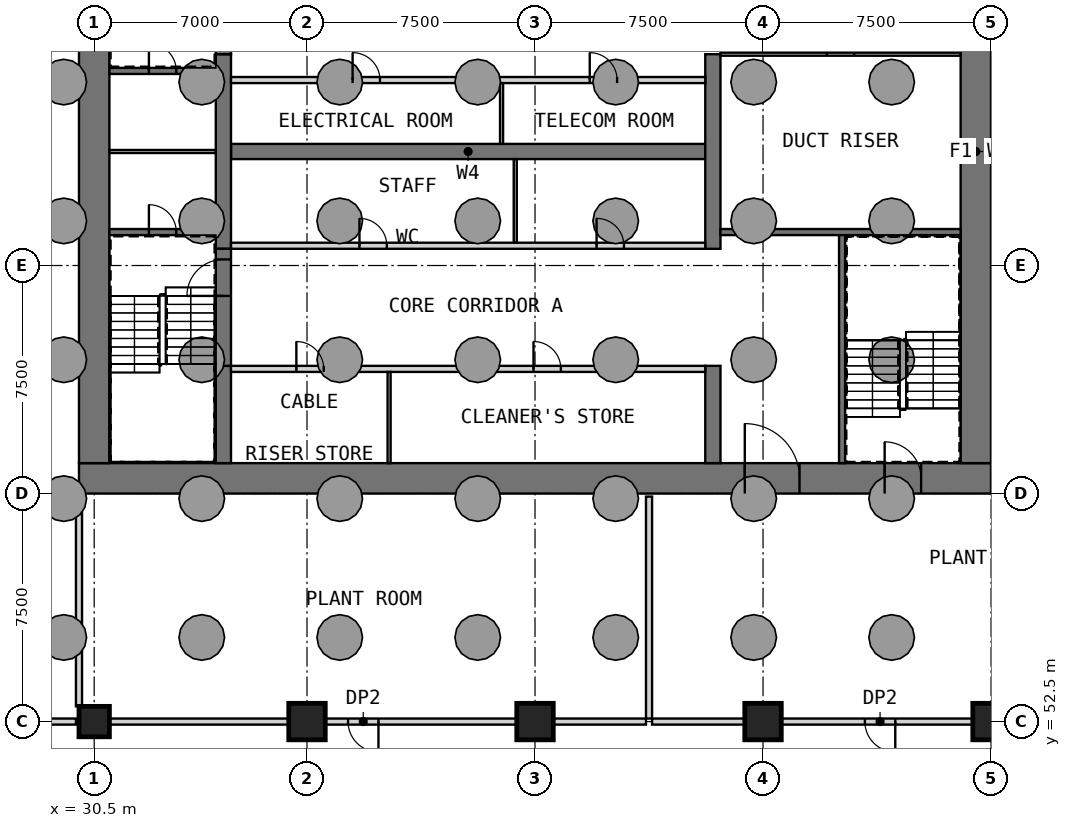
"""IFC4 building model, lengths in metres.
Left out: names, types, materials, properties, quantities, classifications, styles, units other than length and angle.
Written with IfcOpenShell. Run it as: python <this file> out.ifc"""

import sys

from ifc_helpers import new_model, si_unit, direction, frame, frame_2d, origin, origin_2d, place, context, subcontext, project, spatial, rectangle, extrude, element, fill, save


model = new_model("IFC4")
c1 = context("Model", 3, precision=1e-05, world=origin(), true_north=direction((0.0, 1.0)))
c2 = subcontext(c1, "Body", "Model", "MODEL_VIEW")
j1 = project(units=[si_unit("LENGTHUNIT", "METRE"), si_unit("PLANEANGLEUNIT", "RADIAN")], contexts=[c1])
p1 = place(None, origin())
s1 = spatial("IfcSite", under=j1, at=p1, CompositionType="ELEMENT")
p2 = place(p1, origin())
s2 = spatial("IfcBuilding", under=s1, at=p2, CompositionType="ELEMENT")
p3 = place(p2, frame((0.0, 0.0, -12.0)))
s3 = spatial("IfcBuildingStorey", under=s2, at=p3, CompositionType="ELEMENT", Elevation=-12.0)
p4 = place(p3, frame((30.5, 52.5, 0.0), z_axis=(0.0, 0.0, 1.0), x_axis=(1.0, 0.0, 0.0)))
e1 = element("IfcColumn", 1, at=p4, inside=s3, PredefinedType="COLUMN", context=c2, shape_type="SweptSolid", body=[
    extrude(rectangle(XDim=1.0, YDim=1.0, at=origin_2d()), origin(), (0.0, 0.0, 1.0), 6.0),
])
for number, where, z_axis, x_axis in (
    (2, (37.5, 52.5, 0.0), (0.0, 0.0, 1.0), (1.0, 0.0, 0.0)),
    (3, (45.0, 52.5, 0.0), (0.0, 0.0, 1.0), (1.0, 0.0, 0.0)),
    (4, (52.5, 52.5, 0.0), (0.0, 0.0, 1.0), (1.0, 0.0, 0.0)),
    (5, (60.0, 52.5, 0.0), (0.0, 0.0, 1.0), (1.0, 0.0, 0.0)),
):
    element("IfcColumn", number, at=place(p3, frame(where, z_axis=z_axis, x_axis=x_axis)), inside=s3, PredefinedType="COLUMN", context=c2, shape_type="SweptSolid", body=[
        extrude(rectangle(XDim=1.2, YDim=1.2, at=origin_2d()), origin(), (0.0, 0.0, 1.0), 6.0),
    ])
p5 = place(p3, frame((30.0, 60.5, 0.0), z_axis=(0.0, 0.0, 1.0), x_axis=(1.0, 0.0, 0.0)))
e6 = element("IfcWall", 6, at=p5, inside=s3, PredefinedType="SHEAR", context=c2, shape_type="SweptSolid", body=[
    extrude(rectangle(XDim=30.0, YDim=1.0, at=frame_2d((15.0, 0.0))), origin(), (0.0, 0.0, 1.0), 6.0),
])
p6 = place(p5, frame((21.9, 0.0, 0.0)))
e7 = element("IfcOpeningElement", 7, at=p6, cuts=e6, PredefinedType="OPENING", context=c2, shape_type="SweptSolid", body=[
    extrude(rectangle(XDim=1.8, YDim=2.1, at=frame_2d((0.9, 1.05))), frame((0.0, 0.51, 0.0), z_axis=(0.0, -1.0, 0.0), x_axis=(1.0, 0.0, 0.0)), (0.0, 0.0, 1.0), 1.02),
])
p7 = place(p5, frame((26.5, 0.0, 0.0)))
e8 = element("IfcOpeningElement", 8, at=p7, cuts=e6, PredefinedType="OPENING", context=c2, shape_type="SweptSolid", body=[
    extrude(rectangle(XDim=1.2, YDim=2.1, at=frame_2d((0.6, 1.05))), frame((0.0, 0.51, 0.0), z_axis=(0.0, -1.0, 0.0), x_axis=(1.0, 0.0, 0.0)), (0.0, 0.0, 1.0), 1.02),
])
p8 = place(p3, frame((30.5, 61.0, 0.0), z_axis=(0.0, 0.0, 1.0), x_axis=(0.0, 1.0, 0.0)))
e9 = element("IfcWall", 9, at=p8, inside=s3, PredefinedType="SHEAR", context=c2, shape_type="SweptSolid", body=[
    extrude(rectangle(XDim=20.5, YDim=1.0, at=frame_2d((10.25, 0.0))), origin(), (0.0, 0.0, 1.0), 6.0),
])
p9 = place(p3, frame((59.5, 61.0, 0.0), z_axis=(0.0, 0.0, 1.0), x_axis=(0.0, 1.0, 0.0)))
e10 = element("IfcWall", 10, at=p9, inside=s3, PredefinedType="SHEAR", context=c2, shape_type="SweptSolid", body=[
    extrude(rectangle(XDim=20.5, YDim=1.0, at=frame_2d((10.25, 0.0))), origin(), (0.0, 0.0, 1.0), 6.0),
])
p10 = place(p9, frame((14.5, 0.0, 0.0)))
e11 = element("IfcOpeningElement", 11, at=p10, cuts=e10, PredefinedType="OPENING", context=c2, shape_type="SweptSolid", body=[
    extrude(rectangle(XDim=1.8, YDim=2.1, at=frame_2d((0.9, 1.05))), frame((0.0, 0.51, 0.0), z_axis=(0.0, -1.0, 0.0), x_axis=(1.0, 0.0, 0.0)), (0.0, 0.0, 1.0), 1.02),
])
p11 = place(p3, frame((35.0, 71.25, 0.0), z_axis=(0.0, 0.0, 1.0), x_axis=(1.0, 0.0, 0.0)))
e12 = element("IfcWall", 12, at=p11, inside=s3, PredefinedType="SHEAR", context=c2, shape_type="SweptSolid", body=[
    extrude(rectangle(XDim=15.6, YDim=0.5, at=frame_2d((7.8, 0.0))), origin(), (0.0, 0.0, 1.0), 6.0),
])
p12 = place(p3, frame((34.75, 61.0, 0.0), z_axis=(0.0, 0.0, 1.0), x_axis=(0.0, 1.0, 0.0)))
e13 = element("IfcWall", 13, at=p12, inside=s3, PredefinedType="SHEAR", context=c2, shape_type="SweptSolid", body=[
    extrude(rectangle(XDim=3.2, YDim=0.5, at=frame_2d((1.6, 0.0))), origin(), (0.0, 0.0, 1.0), 6.0),
])
p13 = place(p3, frame((34.75, 68.05, 0.0), z_axis=(0.0, 0.0, 1.0), x_axis=(0.0, 1.0, 0.0)))
e14 = element("IfcWall", 14, at=p13, inside=s3, PredefinedType="SHEAR", context=c2, shape_type="SweptSolid", body=[
    extrude(rectangle(XDim=6.4, YDim=0.5, at=frame_2d((3.2, 0.0))), origin(), (0.0, 0.0, 1.0), 6.0),
])
p14 = place(p3, frame((50.85, 61.0, 0.0), z_axis=(0.0, 0.0, 1.0), x_axis=(0.0, 1.0, 0.0)))
e15 = element("IfcWall", 15, at=p14, inside=s3, PredefinedType="SHEAR", context=c2, shape_type="SweptSolid", body=[
    extrude(rectangle(XDim=3.2, YDim=0.5, at=frame_2d((1.6, 0.0))), origin(), (0.0, 0.0, 1.0), 6.0),
])
p15 = place(p3, frame((50.85, 68.05, 0.0), z_axis=(0.0, 0.0, 1.0), x_axis=(0.0, 1.0, 0.0)))
e16 = element("IfcWall", 16, at=p15, inside=s3, PredefinedType="SHEAR", context=c2, shape_type="SweptSolid", body=[
    extrude(rectangle(XDim=6.4, YDim=0.5, at=frame_2d((3.2, 0.0))), origin(), (0.0, 0.0, 1.0), 6.0),
])
p16 = place(p3, frame((35.0, 64.1, 0.0), z_axis=(0.0, 0.0, 1.0), x_axis=(1.0, 0.0, 0.0)))
e17 = element("IfcWall", 17, at=p16, inside=s3, PredefinedType="PARTITIONING", context=c2, shape_type="SweptSolid", body=[
    extrude(rectangle(XDim=15.6, YDim=0.2, at=frame_2d((7.8, 0.0))), origin(), (0.0, 0.0, 1.0), 5.4),
])
p17 = place(p16, frame((2.15, 0.0, 0.0)))
e18 = element("IfcOpeningElement", 18, at=p17, cuts=e17, PredefinedType="OPENING", context=c2, shape_type="SweptSolid", body=[
    extrude(rectangle(XDim=0.9, YDim=2.1, at=frame_2d((0.45, 1.05))), frame((0.0, 0.11, 0.0), z_axis=(0.0, -1.0, 0.0), x_axis=(1.0, 0.0, 0.0)), (0.0, 0.0, 1.0), 0.22),
])
p18 = place(p16, frame((9.95, 0.0, 0.0)))
e19 = element("IfcOpeningElement", 19, at=p18, cuts=e17, PredefinedType="OPENING", context=c2, shape_type="SweptSolid", body=[
    extrude(rectangle(XDim=0.9, YDim=2.1, at=frame_2d((0.45, 1.05))), frame((0.0, 0.11, 0.0), z_axis=(0.0, -1.0, 0.0), x_axis=(1.0, 0.0, 0.0)), (0.0, 0.0, 1.0), 0.22),
])
p19 = place(p3, frame((40.2, 61.0, 0.0), z_axis=(0.0, 0.0, 1.0), x_axis=(0.0, 1.0, 0.0)))
e20 = element("IfcWall", 20, at=p19, inside=s3, PredefinedType="PARTITIONING", context=c2, shape_type="SweptSolid", body=[
    extrude(rectangle(XDim=3.0, YDim=0.1, at=frame_2d((1.5, 0.0))), origin(), (0.0, 0.0, 1.0), 5.4),
])
p20 = place(p3, frame((35.0, 68.15, 0.0), z_axis=(0.0, 0.0, 1.0), x_axis=(1.0, 0.0, 0.0)))
e21 = element("IfcWall", 21, at=p20, inside=s3, PredefinedType="PARTITIONING", context=c2, shape_type="SweptSolid", body=[
    extrude(rectangle(XDim=15.6, YDim=0.2, at=frame_2d((7.8, 0.0))), origin(), (0.0, 0.0, 1.0), 5.4),
])
p21 = place(p20, frame((4.225, 0.0, 0.0)))
e22 = element("IfcOpeningElement", 22, at=p21, cuts=e21, PredefinedType="OPENING", context=c2, shape_type="SweptSolid", body=[
    extrude(rectangle(XDim=0.9, YDim=2.1, at=frame_2d((0.45, 1.05))), frame((0.0, 0.11, 0.0), z_axis=(0.0, -1.0, 0.0), x_axis=(1.0, 0.0, 0.0)), (0.0, 0.0, 1.0), 0.22),
])
p22 = place(p20, frame((12.025, 0.0, 0.0)))
e23 = element("IfcOpeningElement", 23, at=p22, cuts=e21, PredefinedType="OPENING", context=c2, shape_type="SweptSolid", body=[
    extrude(rectangle(XDim=0.9, YDim=2.1, at=frame_2d((0.45, 1.05))), frame((0.0, 0.11, 0.0), z_axis=(0.0, -1.0, 0.0), x_axis=(1.0, 0.0, 0.0)), (0.0, 0.0, 1.0), 0.22),
])
p23 = place(p3, frame((44.35, 68.25, 0.0), z_axis=(0.0, 0.0, 1.0), x_axis=(0.0, 1.0, 0.0)))
e24 = element("IfcWall", 24, at=p23, inside=s3, PredefinedType="PARTITIONING", context=c2, shape_type="SweptSolid", body=[
    extrude(rectangle(XDim=2.75, YDim=0.1, at=frame_2d((1.375, 0.0))), origin(), (0.0, 0.0, 1.0), 5.4),
])
p24 = place(p3, frame((35.0, 73.6, 0.0), z_axis=(0.0, 0.0, 1.0), x_axis=(1.0, 0.0, 0.0)))
e25 = element("IfcWall", 25, at=p24, inside=s3, PredefinedType="PARTITIONING", context=c2, shape_type="SweptSolid", body=[
    extrude(rectangle(XDim=15.6, YDim=0.2, at=frame_2d((7.8, 0.0))), origin(), (0.0, 0.0, 1.0), 5.4),
])
p25 = place(p24, frame((4.0, 0.0, 0.0)))
e26 = element("IfcOpeningElement", 26, at=p25, cuts=e25, PredefinedType="OPENING", context=c2, shape_type="SweptSolid", body=[
    extrude(rectangle(XDim=0.9, YDim=2.1, at=frame_2d((0.45, 1.05))), frame((0.0, 0.11, 0.0), z_axis=(0.0, -1.0, 0.0), x_axis=(1.0, 0.0, 0.0)), (0.0, 0.0, 1.0), 0.22),
])
p26 = place(p24, frame((11.8, 0.0, 0.0)))
e27 = element("IfcOpeningElement", 27, at=p26, cuts=e25, PredefinedType="OPENING", context=c2, shape_type="SweptSolid", body=[
    extrude(rectangle(XDim=0.9, YDim=2.1, at=frame_2d((0.45, 1.05))), frame((0.0, 0.11, 0.0), z_axis=(0.0, -1.0, 0.0), x_axis=(1.0, 0.0, 0.0)), (0.0, 0.0, 1.0), 0.22),
])
p27 = place(p3, frame((43.9, 71.5, 0.0), z_axis=(0.0, 0.0, 1.0), x_axis=(0.0, 1.0, 0.0)))
e28 = element("IfcWall", 28, at=p27, inside=s3, PredefinedType="PARTITIONING", context=c2, shape_type="SweptSolid", body=[
    extrude(rectangle(XDim=2.0, YDim=0.1, at=frame_2d((1.0, 0.0))), origin(), (0.0, 0.0, 1.0), 5.4),
])
p28 = place(p3, frame((34.75, 64.2, 0.0), z_axis=(0.0, 0.0, 1.0), x_axis=(0.0, 1.0, 0.0)))
e29 = element("IfcWall", 29, at=p28, inside=s3, PredefinedType="SOLIDWALL", context=c2, shape_type="SweptSolid", body=[
    extrude(rectangle(XDim=3.85, YDim=0.5, at=frame_2d((1.925, 0.0))), origin(), (0.0, 0.0, 1.0), 4.8),
])
p29 = place(p28, frame((2.3, 0.0, 0.0)))
e30 = element("IfcOpeningElement", 30, at=p29, cuts=e29, PredefinedType="OPENING", context=c2, shape_type="SweptSolid", body=[
    extrude(rectangle(XDim=1.2, YDim=2.1, at=frame_2d((0.6, 1.05))), frame((0.0, 0.26, 0.0), z_axis=(0.0, -1.0, 0.0), x_axis=(1.0, 0.0, 0.0)), (0.0, 0.0, 1.0), 0.52),
])
p30 = place(p3, frame((34.75, 74.45, 0.0), z_axis=(0.0, 0.0, 1.0), x_axis=(0.0, 1.0, 0.0)))
e31 = element("IfcWall", 31, at=p30, inside=s3, PredefinedType="SOLIDWALL", context=c2, shape_type="SweptSolid", body=[
    extrude(rectangle(XDim=3.85, YDim=0.5, at=frame_2d((1.925, 0.0))), origin(), (0.0, 0.0, 1.0), 4.8),
])
p31 = place(p30, frame((1.0, 0.0, 0.0)))
e32 = element("IfcOpeningElement", 32, at=p31, cuts=e31, PredefinedType="OPENING", context=c2, shape_type="SweptSolid", body=[
    extrude(rectangle(XDim=1.2, YDim=2.1, at=frame_2d((0.6, 1.05))), frame((0.0, 0.26, 0.0), z_axis=(0.0, -1.0, 0.0), x_axis=(1.0, 0.0, 0.0)), (0.0, 0.0, 1.0), 0.52),
])
p32 = place(p3, frame((31.0, 68.6, 0.0), z_axis=(0.0, 0.0, 1.0), x_axis=(1.0, 0.0, 0.0)))
e33 = element("IfcWall", 33, at=p32, inside=s3, PredefinedType="SOLIDWALL", context=c2, shape_type="SweptSolid", body=[
    extrude(rectangle(XDim=3.5, YDim=0.2, at=frame_2d((1.75, 0.0))), origin(), (0.0, 0.0, 1.0), 5.4),
])
p33 = place(p32, frame((1.3, 0.0, 0.0)))
e34 = element("IfcOpeningElement", 34, at=p33, cuts=e33, PredefinedType="OPENING", context=c2, shape_type="SweptSolid", body=[
    extrude(rectangle(XDim=0.9, YDim=2.1, at=frame_2d((0.45, 1.05))), frame((0.0, 0.11, 0.0), z_axis=(0.0, -1.0, 0.0), x_axis=(1.0, 0.0, 0.0)), (0.0, 0.0, 1.0), 0.22),
])
p34 = place(p3, frame((31.0, 73.9, 0.0), z_axis=(0.0, 0.0, 1.0), x_axis=(1.0, 0.0, 0.0)))
e35 = element("IfcWall", 35, at=p34, inside=s3, PredefinedType="SOLIDWALL", context=c2, shape_type="SweptSolid", body=[
    extrude(rectangle(XDim=3.5, YDim=0.2, at=frame_2d((1.75, 0.0))), origin(), (0.0, 0.0, 1.0), 5.4),
])
p35 = place(p34, frame((1.3, 0.0, 0.0)))
e36 = element("IfcOpeningElement", 36, at=p35, cuts=e35, PredefinedType="OPENING", context=c2, shape_type="SweptSolid", body=[
    extrude(rectangle(XDim=0.9, YDim=2.1, at=frame_2d((0.45, 1.05))), frame((0.0, 0.11, 0.0), z_axis=(0.0, -1.0, 0.0), x_axis=(1.0, 0.0, 0.0)), (0.0, 0.0, 1.0), 0.22),
])
p36 = place(p3, frame((55.1, 61.0, 0.0), z_axis=(0.0, 0.0, 1.0), x_axis=(0.0, 1.0, 0.0)))
e37 = element("IfcWall", 37, at=p36, inside=s3, PredefinedType="SOLIDWALL", context=c2, shape_type="SweptSolid", body=[
    extrude(rectangle(XDim=7.6, YDim=0.2, at=frame_2d((3.8, 0.0))), origin(), (0.0, 0.0, 1.0), 5.4),
])
p37 = place(p3, frame((51.1, 68.6, 0.0), z_axis=(0.0, 0.0, 1.0), x_axis=(1.0, 0.0, 0.0)))
e38 = element("IfcWall", 38, at=p37, inside=s3, PredefinedType="SOLIDWALL", context=c2, shape_type="SweptSolid", body=[
    extrude(rectangle(XDim=7.9, YDim=0.2, at=frame_2d((3.95, 0.0))), origin(), (0.0, 0.0, 1.0), 5.4),
])
p38 = place(p3, frame((31.0, 71.25, 0.0), z_axis=(0.0, 0.0, 1.0), x_axis=(1.0, 0.0, 0.0)))
e39 = element("IfcWall", 39, at=p38, inside=s3, PredefinedType="PARTITIONING", context=c2, shape_type="SweptSolid", body=[
    extrude(rectangle(XDim=3.5, YDim=0.1, at=frame_2d((1.75, 0.0))), origin(), (0.0, 0.0, 1.0), 5.4),
])
p39 = place(p3, frame((51.1, 74.45, 0.0), z_axis=(0.0, 0.0, 1.0), x_axis=(1.0, 0.0, 0.0)))
e40 = element("IfcWall", 40, at=p39, inside=s3, PredefinedType="PARTITIONING", context=c2, shape_type="SweptSolid", body=[
    extrude(rectangle(XDim=7.9, YDim=0.1, at=frame_2d((3.95, 0.0))), origin(), (0.0, 0.0, 1.0), 5.4),
])
p40 = place(p39, frame((3.5, 0.0, 0.0)))
e41 = element("IfcOpeningElement", 41, at=p40, cuts=e40, PredefinedType="OPENING", context=c2, shape_type="SweptSolid", body=[
    extrude(rectangle(XDim=0.9, YDim=2.1, at=frame_2d((0.45, 1.05))), frame((0.0, 0.06, 0.0), z_axis=(0.0, -1.0, 0.0), x_axis=(1.0, 0.0, 0.0)), (0.0, 0.0, 1.0), 0.12),
])
p41 = place(p3, frame((23.6, 52.5, 0.0), z_axis=(0.0, 0.0, 1.0), x_axis=(1.0, 0.0, 0.0)))
e42 = element("IfcWall", 42, at=p41, inside=s3, PredefinedType="PARTITIONING", context=c2, shape_type="SweptSolid", body=[
    extrude(rectangle(XDim=6.3, YDim=0.2, at=frame_2d((3.15, 0.0))), origin(), (0.0, 0.0, 1.0), 5.4),
])
p42 = place(p3, frame((31.0, 52.5, 0.0), z_axis=(0.0, 0.0, 1.0), x_axis=(1.0, 0.0, 0.0)))
e43 = element("IfcWall", 43, at=p42, inside=s3, PredefinedType="PARTITIONING", context=c2, shape_type="SweptSolid", body=[
    extrude(rectangle(XDim=5.9, YDim=0.2, at=frame_2d((2.95, 0.0))), origin(), (0.0, 0.0, 1.0), 5.4),
])
p43 = place(p3, frame((44.4, 52.5, 0.0), z_axis=(0.0, 0.0, 1.0), x_axis=(-1.0, 0.0, 0.0)))
e44 = element("IfcWall", 44, at=p43, inside=s3, PredefinedType="PARTITIONING", context=c2, shape_type="SweptSolid", body=[
    extrude(rectangle(XDim=6.3, YDim=0.2, at=frame_2d((3.15, 0.0))), origin(), (0.0, 0.0, 1.0), 5.4),
])
p44 = place(p43, frame((4.55, 0.0, 0.0)))
e45 = element("IfcOpeningElement", 45, at=p44, cuts=e44, PredefinedType="OPENING", context=c2, shape_type="SweptSolid", body=[
    extrude(rectangle(XDim=1.0, YDim=2.1, at=frame_2d((0.5, 1.05))), frame((0.0, 0.11, 0.0), z_axis=(0.0, -1.0, 0.0), x_axis=(1.0, 0.0, 0.0)), (0.0, 0.0, 1.0), 0.22),
])
for number, where, z_axis, x_axis in (
    (46, (45.6, 52.5, 0.0), (0.0, 0.0, 1.0), (1.0, 0.0, 0.0)),
    (47, (48.85, 52.5, 0.0), (0.0, 0.0, 1.0), (1.0, 0.0, 0.0)),
):
    element("IfcWall", number, at=place(p3, frame(where, z_axis=z_axis, x_axis=x_axis)), inside=s3, PredefinedType="PARTITIONING", context=c2, shape_type="SweptSolid", body=[
        extrude(rectangle(XDim=3.05, YDim=0.2, at=frame_2d((1.525, 0.0))), origin(), (0.0, 0.0, 1.0), 5.4),
    ])
p45 = place(p3, frame((59.4, 52.5, 0.0), z_axis=(0.0, 0.0, 1.0), x_axis=(-1.0, 0.0, 0.0)))
e48 = element("IfcWall", 48, at=p45, inside=s3, PredefinedType="PARTITIONING", context=c2, shape_type="SweptSolid", body=[
    extrude(rectangle(XDim=6.3, YDim=0.2, at=frame_2d((3.15, 0.0))), origin(), (0.0, 0.0, 1.0), 5.4),
])
p46 = place(p45, frame((2.55, 0.0, 0.0)))
e49 = element("IfcOpeningElement", 49, at=p46, cuts=e48, PredefinedType="OPENING", context=c2, shape_type="SweptSolid", body=[
    extrude(rectangle(XDim=1.0, YDim=2.1, at=frame_2d((0.5, 1.05))), frame((0.0, 0.11, 0.0), z_axis=(0.0, -1.0, 0.0), x_axis=(1.0, 0.0, 0.0)), (0.0, 0.0, 1.0), 0.22),
])
p47 = place(p3, frame((48.75, 52.6, 0.0), z_axis=(0.0, 0.0, 1.0), x_axis=(0.0, 1.0, 0.0)))
e50 = element("IfcWall", 50, at=p47, inside=s3, PredefinedType="PARTITIONING", context=c2, shape_type="SweptSolid", body=[
    extrude(rectangle(XDim=7.3, YDim=0.2, at=frame_2d((3.65, 0.0))), origin(), (0.0, 0.0, 1.0), 5.4),
])
p48 = place(p3, frame((30.0, 53.0, 0.0), z_axis=(0.0, 0.0, 1.0), x_axis=(0.0, 1.0, 0.0)))
e51 = element("IfcWall", 51, at=p48, inside=s3, PredefinedType="PARTITIONING", context=c2, shape_type="SweptSolid", body=[
    extrude(rectangle(XDim=6.9, YDim=0.2, at=frame_2d((3.45, 0.0))), origin(), (0.0, 0.0, 1.0), 5.4),
])
p49 = place(p17, origin())
e52 = element("IfcDoor", 52, at=p49, inside=s3, OperationType="SINGLE_SWING_RIGHT", PredefinedType="DOOR", context=c2, shape_type="SweptSolid", body=[
    extrude(rectangle(XDim=0.9, YDim=2.1, at=frame_2d((0.45, 1.05))), frame((0.0, 0.025, 0.0), z_axis=(0.0, -1.0, 0.0), x_axis=(1.0, 0.0, 0.0)), (0.0, 0.0, 1.0), 0.05),
])
fill(e18, e52)
p50 = place(p18, origin())
e53 = element("IfcDoor", 53, at=p50, inside=s3, OperationType="SINGLE_SWING_LEFT", PredefinedType="DOOR", context=c2, shape_type="SweptSolid", body=[
    extrude(rectangle(XDim=0.9, YDim=2.1, at=frame_2d((0.45, 1.05))), frame((0.0, 0.025, 0.0), z_axis=(0.0, -1.0, 0.0), x_axis=(1.0, 0.0, 0.0)), (0.0, 0.0, 1.0), 0.05),
])
fill(e19, e53)
p51 = place(p21, origin())
e54 = element("IfcDoor", 54, at=p51, inside=s3, OperationType="SINGLE_SWING_RIGHT", PredefinedType="DOOR", context=c2, shape_type="SweptSolid", body=[
    extrude(rectangle(XDim=0.9, YDim=2.1, at=frame_2d((0.45, 1.05))), frame((0.0, 0.025, 0.0), z_axis=(0.0, -1.0, 0.0), x_axis=(1.0, 0.0, 0.0)), (0.0, 0.0, 1.0), 0.05),
])
fill(e22, e54)
p52 = place(p22, origin())
e55 = element("IfcDoor", 55, at=p52, inside=s3, OperationType="SINGLE_SWING_LEFT", PredefinedType="DOOR", context=c2, shape_type="SweptSolid", body=[
    extrude(rectangle(XDim=0.9, YDim=2.1, at=frame_2d((0.45, 1.05))), frame((0.0, 0.025, 0.0), z_axis=(0.0, -1.0, 0.0), x_axis=(1.0, 0.0, 0.0)), (0.0, 0.0, 1.0), 0.05),
])
fill(e23, e55)
p53 = place(p25, origin())
e56 = element("IfcDoor", 56, at=p53, inside=s3, OperationType="SINGLE_SWING_RIGHT", PredefinedType="DOOR", context=c2, shape_type="SweptSolid", body=[
    extrude(rectangle(XDim=0.9, YDim=2.1, at=frame_2d((0.45, 1.05))), frame((0.0, 0.025, 0.0), z_axis=(0.0, -1.0, 0.0), x_axis=(1.0, 0.0, 0.0)), (0.0, 0.0, 1.0), 0.05),
])
fill(e26, e56)
p54 = place(p26, origin())
e57 = element("IfcDoor", 57, at=p54, inside=s3, OperationType="SINGLE_SWING_LEFT", PredefinedType="DOOR", context=c2, shape_type="SweptSolid", body=[
    extrude(rectangle(XDim=0.9, YDim=2.1, at=frame_2d((0.45, 1.05))), frame((0.0, 0.025, 0.0), z_axis=(0.0, -1.0, 0.0), x_axis=(1.0, 0.0, 0.0)), (0.0, 0.0, 1.0), 0.05),
])
fill(e27, e57)
p55 = place(p6, origin())
e58 = element("IfcDoor", 58, at=p55, inside=s3, OperationType="DOUBLE_DOOR_SINGLE_SWING", PredefinedType="DOOR", context=c2, shape_type="SweptSolid", body=[
    extrude(rectangle(XDim=1.8, YDim=2.1, at=frame_2d((0.9, 1.05))), frame((0.0, 0.025, 0.0), z_axis=(0.0, -1.0, 0.0), x_axis=(1.0, 0.0, 0.0)), (0.0, 0.0, 1.0), 0.05),
])
fill(e7, e58)
p56 = place(p29, origin())
e59 = element("IfcDoor", 59, at=p56, inside=s3, OperationType="SINGLE_SWING_LEFT", PredefinedType="DOOR", context=c2, shape_type="SweptSolid", body=[
    extrude(rectangle(XDim=1.2, YDim=2.1, at=frame_2d((0.6, 1.05))), frame((0.0, 0.025, 0.0), z_axis=(0.0, -1.0, 0.0), x_axis=(1.0, 0.0, 0.0)), (0.0, 0.0, 1.0), 0.05),
])
fill(e30, e59)
p57 = place(p33, origin())
e60 = element("IfcDoor", 60, at=p57, inside=s3, OperationType="SINGLE_SWING_LEFT", PredefinedType="DOOR", context=c2, shape_type="SweptSolid", body=[
    extrude(rectangle(XDim=0.9, YDim=2.1, at=frame_2d((0.45, 1.05))), frame((0.0, 0.025, 0.0), z_axis=(0.0, -1.0, 0.0), x_axis=(1.0, 0.0, 0.0)), (0.0, 0.0, 1.0), 0.05),
])
fill(e34, e60)
p58 = place(p35, origin())
e61 = element("IfcDoor", 61, at=p58, inside=s3, OperationType="SINGLE_SWING_RIGHT", PredefinedType="DOOR", context=c2, shape_type="SweptSolid", body=[
    extrude(rectangle(XDim=0.9, YDim=2.1, at=frame_2d((0.45, 1.05))), frame((0.0, 0.025, 0.0), z_axis=(0.0, -1.0, 0.0), x_axis=(1.0, 0.0, 0.0)), (0.0, 0.0, 1.0), 0.05),
])
fill(e36, e61)
p59 = place(p7, origin())
e62 = element("IfcDoor", 62, at=p59, inside=s3, OperationType="SINGLE_SWING_LEFT", PredefinedType="DOOR", context=c2, shape_type="SweptSolid", body=[
    extrude(rectangle(XDim=1.2, YDim=2.1, at=frame_2d((0.6, 1.05))), frame((0.0, 0.025, 0.0), z_axis=(0.0, -1.0, 0.0), x_axis=(1.0, 0.0, 0.0)), (0.0, 0.0, 1.0), 0.05),
])
fill(e8, e62)
p60 = place(p40, origin())
e63 = element("IfcDoor", 63, at=p60, inside=s3, OperationType="SINGLE_SWING_RIGHT", PredefinedType="DOOR", context=c2, shape_type="SweptSolid", body=[
    extrude(rectangle(XDim=0.9, YDim=2.1, at=frame_2d((0.45, 1.05))), frame((0.0, 0.025, 0.0), z_axis=(0.0, -1.0, 0.0), x_axis=(1.0, 0.0, 0.0)), (0.0, 0.0, 1.0), 0.05),
])
fill(e41, e63)
p61 = place(p44, origin())
e64 = element("IfcDoor", 64, at=p61, inside=s3, OperationType="SINGLE_SWING_LEFT", PredefinedType="DOOR", context=c2, shape_type="SweptSolid", body=[
    extrude(rectangle(XDim=1.0, YDim=2.1, at=frame_2d((0.5, 1.05))), frame((0.0, 0.025, 0.0), z_axis=(0.0, -1.0, 0.0), x_axis=(1.0, 0.0, 0.0)), (0.0, 0.0, 1.0), 0.05),
])
fill(e45, e64)
p62 = place(p46, origin())
e65 = element("IfcDoor", 65, at=p62, inside=s3, OperationType="SINGLE_SWING_LEFT", PredefinedType="DOOR", context=c2, shape_type="SweptSolid", body=[
    extrude(rectangle(XDim=1.0, YDim=2.1, at=frame_2d((0.5, 1.05))), frame((0.0, 0.025, 0.0), z_axis=(0.0, -1.0, 0.0), x_axis=(1.0, 0.0, 0.0)), (0.0, 0.0, 1.0), 0.05),
])
fill(e49, e65)
save(model, sys.argv[1])
